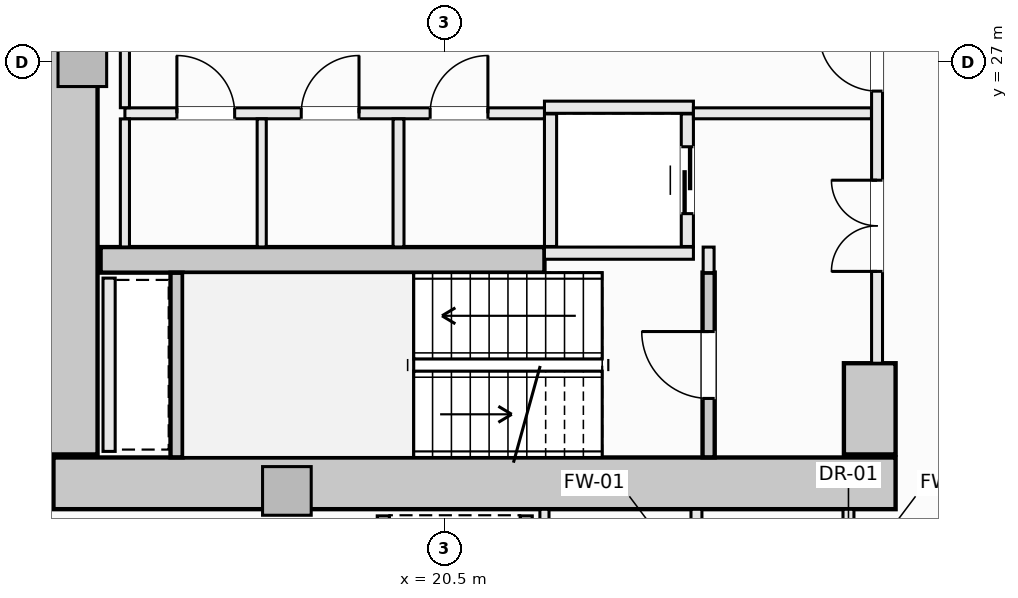
"""IFC4 building model, lengths in metres.
Left out: names, types, materials, properties, quantities, classifications, styles, units other than length and angle.
Written with IfcOpenShell. Run it as: python <this file> out.ifc"""

import sys

from ifc_helpers import new_model, si_unit, direction, frame, frame_2d, origin, origin_2d, place, context, subcontext, project, spatial, rectangle, extrude, element, fill, save


model = new_model("IFC4")
c1 = context("Model", 3, precision=1e-05, world=origin(), true_north=direction((0.0, 1.0)))
c2 = subcontext(c1, "Body", "Model", "MODEL_VIEW")
j1 = project(units=[si_unit("LENGTHUNIT", "METRE"), si_unit("PLANEANGLEUNIT", "RADIAN")], contexts=[c1])
p1 = place(None, origin())
s1 = spatial("IfcSite", under=j1, at=p1, CompositionType="ELEMENT")
p2 = place(p1, origin())
s2 = spatial("IfcBuilding", under=s1, at=p2, CompositionType="ELEMENT")
p3 = place(p2, frame((0.0, 0.0, 38.05)))
s3 = spatial("IfcBuildingStorey", under=s2, at=p3, CompositionType="ELEMENT", Elevation=38.05)
p4 = place(p3, frame((14.075, 20.075, -0.28), z_axis=(0.0, 0.0, 1.0), x_axis=(1.0, 0.0, 0.0)))
e1 = element("IfcWall", 1, at=p4, inside=s3, PredefinedType="SHEAR", context=c2, shape_type="SweptSolid", body=[
    extrude(rectangle(XDim=13.85, YDim=0.85, at=frame_2d((6.925, 0.0))), origin(), (0.0, 0.0, 1.0), 3.85),
])
p5 = place(p3, frame((14.375, 20.55, -0.28), z_axis=(0.0, 0.0, 1.0), x_axis=(0.0, 1.0, 0.0)))
e2 = element("IfcWall", 2, at=p5, inside=s3, PredefinedType="SHEAR", context=c2, shape_type="SweptSolid", body=[
    extrude(rectangle(XDim=12.9, YDim=0.85, at=frame_2d((6.45, 0.0))), origin(), (0.0, 0.0, 1.0), 3.85),
])
p6 = place(p3, frame((27.5, 20.55, -0.28), z_axis=(0.0, 0.0, 1.0), x_axis=(0.0, 1.0, 0.0)))
e3 = element("IfcWall", 3, at=p6, inside=s3, PredefinedType="SHEAR", context=c2, shape_type="SweptSolid", body=[
    extrude(rectangle(XDim=1.5, YDim=0.85, at=frame_2d((0.75, 0.0))), origin(), (0.0, 0.0, 1.0), 3.85),
])
p7 = place(p3, frame((14.85, 23.75, -0.28), z_axis=(0.0, 0.0, 1.0), x_axis=(1.0, 0.0, 0.0)))
e4 = element("IfcWall", 4, at=p7, inside=s3, PredefinedType="SHEAR", context=c2, shape_type="SweptSolid", body=[
    extrude(rectangle(XDim=7.3, YDim=0.42, at=frame_2d((3.65, 0.0))), origin(), (0.0, 0.0, 1.0), 3.85),
])
for number, where, z_axis, x_axis in (
    (5, (14.55, 27.0, -0.28), (0.0, 0.0, 1.0), (1.0, 0.0, 0.0)),
    (6, (17.914, 19.95, -0.28), (0.0, 0.0, 1.0), (1.0, 0.0, 0.0)),
):
    element("IfcColumn", number, at=place(p3, frame(where, z_axis=z_axis, x_axis=x_axis)), inside=s3, PredefinedType="PILASTER", context=c2, shape_type="SweptSolid", body=[
        extrude(rectangle(XDim=0.8, YDim=0.8, at=origin_2d()), origin(), (0.0, 0.0, 1.0), 3.85),
    ])
p8 = place(p3, frame((24.85, 20.502, -0.28), z_axis=(0.0, 0.0, 1.0), x_axis=(0.0, 1.0, 0.0)))
e7 = element("IfcWall", 7, at=p8, inside=s3, PredefinedType="SHEAR", context=c2, shape_type="SweptSolid", body=[
    extrude(rectangle(XDim=3.038, YDim=0.2, at=frame_2d((1.519, 0.0))), origin(), (0.0, 0.0, 1.0), 3.85),
])
p9 = place(p8, frame((0.969, 0.0, 0.28)))
e8 = element("IfcOpeningElement", 8, at=p9, cuts=e7, PredefinedType="OPENING", context=c2, shape_type="SweptSolid", body=[
    extrude(rectangle(XDim=1.1, YDim=2.15, at=frame_2d((0.55, 1.075))), frame((0.0, 0.11, 0.0), z_axis=(0.0, -1.0, 0.0), x_axis=(1.0, 0.0, 0.0)), (0.0, 0.0, 1.0), 0.22),
])
p10 = place(p3, frame((16.1, 20.502, -0.28), z_axis=(0.0, 0.0, 1.0), x_axis=(0.0, 1.0, 0.0)))
e9 = element("IfcWall", 9, at=p10, inside=s3, PredefinedType="SHEAR", context=c2, shape_type="SweptSolid", body=[
    extrude(rectangle(XDim=3.036, YDim=0.2, at=frame_2d((1.518, 0.0))), origin(), (0.0, 0.0, 1.0), 3.85),
])
for number, where, z_axis, x_axis in (
    (10, (22.15, 26.26, 0.0), (0.0, 0.0, 1.0), (1.0, 0.0, 0.0)),
    (11, (22.15, 23.86, 0.0), (0.0, 0.0, 1.0), (1.0, 0.0, 0.0)),
):
    element("IfcWall", number, at=place(p3, frame(where, z_axis=z_axis, x_axis=x_axis)), inside=s3, PredefinedType="SOLIDWALL", context=c2, shape_type="SweptSolid", body=[
        extrude(rectangle(XDim=2.45, YDim=0.2, at=frame_2d((1.225, 0.0))), origin(), (0.0, 0.0, 1.0), 3.57),
    ])
p11 = place(p3, frame((22.25, 23.97, 0.0), z_axis=(0.0, 0.0, 1.0), x_axis=(0.0, 1.0, 0.0)))
e12 = element("IfcWall", 12, at=p11, inside=s3, PredefinedType="SOLIDWALL", context=c2, shape_type="SweptSolid", body=[
    extrude(rectangle(XDim=2.18, YDim=0.2, at=frame_2d((1.09, 0.0))), origin(), (0.0, 0.0, 1.0), 3.57),
])
p12 = place(p3, frame((24.5, 23.97, 0.0), z_axis=(0.0, 0.0, 1.0), x_axis=(0.0, 1.0, 0.0)))
e13 = element("IfcWall", 13, at=p12, inside=s3, PredefinedType="SOLIDWALL", context=c2, shape_type="SweptSolid", body=[
    extrude(rectangle(XDim=2.18, YDim=0.2, at=frame_2d((1.09, 0.0))), origin(), (0.0, 0.0, 1.0), 3.57),
])
p13 = place(p12, frame((0.54, 0.0, 0.0)))
e14 = element("IfcOpeningElement", 14, at=p13, cuts=e13, PredefinedType="OPENING", context=c2, shape_type="SweptSolid", body=[
    extrude(rectangle(XDim=1.1, YDim=2.2, at=frame_2d((0.55, 1.1))), frame((0.0, 0.11, 0.0), z_axis=(0.0, -1.0, 0.0), x_axis=(1.0, 0.0, 0.0)), (0.0, 0.0, 1.0), 0.22),
])
for number, where, z_axis, x_axis in (
    (15, (19.5, 17.01, 0.0), (0.0, 0.0, 1.0), (0.0, 1.0, 0.0)),
    (16, (21.85, 17.01, 0.0), (0.0, 0.0, 1.0), (0.0, 1.0, 0.0)),
):
    element("IfcWall", number, at=place(p3, frame(where, z_axis=z_axis, x_axis=x_axis)), inside=s3, PredefinedType="SOLIDWALL", context=c2, shape_type="SweptSolid", body=[
        extrude(rectangle(XDim=2.53, YDim=0.2, at=frame_2d((1.265, 0.0))), origin(), (0.0, 0.0, 1.0), 3.57),
    ])
p14 = place(p3, frame((14.99, 20.6, 0.0), z_axis=(0.0, 0.0, 1.0), x_axis=(0.0, 1.0, 0.0)))
e17 = element("IfcWall", 17, at=p14, inside=s3, PredefinedType="SOLIDWALL", context=c2, shape_type="SweptSolid", body=[
    extrude(rectangle(XDim=2.85, YDim=0.2, at=frame_2d((1.425, 0.0))), origin(), (0.0, 0.0, 1.0), 3.57),
])
p15 = place(p3, frame((24.85, 23.54, 0.0), z_axis=(0.0, 0.0, 1.0), x_axis=(0.0, 1.0, 0.0)))
e18 = element("IfcWall", 18, at=p15, inside=s3, PredefinedType="SOLIDWALL", context=c2, shape_type="SweptSolid", body=[
    extrude(rectangle(XDim=0.42, YDim=0.18, at=frame_2d((0.21, 0.0))), origin(), (0.0, 0.0, 1.0), 3.57),
])
p16 = place(p3, frame((27.62, 22.05, 0.0), z_axis=(0.0, 0.0, 1.0), x_axis=(0.0, 1.0, 0.0)))
e19 = element("IfcWall", 19, at=p16, inside=s3, PredefinedType="SOLIDWALL", context=c2, shape_type="SweptSolid", body=[
    extrude(rectangle(XDim=9.9, YDim=0.18, at=frame_2d((4.95, 0.0))), origin(), (0.0, 0.0, 1.0), 2.662),
])
p17 = place(p16, frame((4.475, 0.0, 0.0)))
e20 = element("IfcOpeningElement", 20, at=p17, cuts=e19, PredefinedType="OPENING", context=c2, shape_type="SweptSolid", body=[
    extrude(rectangle(XDim=0.95, YDim=2.1, at=frame_2d((0.475, 1.05))), frame((0.0, 0.1, 0.0), z_axis=(0.0, -1.0, 0.0), x_axis=(1.0, 0.0, 0.0)), (0.0, 0.0, 1.0), 0.2),
])
p18 = place(p16, frame((6.89, 0.0, 0.0)))
e21 = element("IfcOpeningElement", 21, at=p18, cuts=e19, PredefinedType="OPENING", context=c2, shape_type="SweptSolid", body=[
    extrude(rectangle(XDim=1.5, YDim=2.2, at=frame_2d((0.75, 1.1))), frame((0.0, 0.1, 0.0), z_axis=(0.0, -1.0, 0.0), x_axis=(1.0, 0.0, 0.0)), (0.0, 0.0, 1.0), 0.2),
])
p19 = place(p16, frame((1.51, 0.0, 0.0)))
e22 = element("IfcOpeningElement", 22, at=p19, cuts=e19, PredefinedType="OPENING", context=c2, shape_type="SweptSolid", body=[
    extrude(rectangle(XDim=1.5, YDim=2.2, at=frame_2d((0.75, 1.1))), frame((0.0, 0.1, 0.0), z_axis=(0.0, -1.0, 0.0), x_axis=(1.0, 0.0, 0.0)), (0.0, 0.0, 1.0), 0.2),
])
p20 = place(p3, frame((15.25, 26.16, 0.0), z_axis=(0.0, 0.0, 1.0), x_axis=(1.0, 0.0, 0.0)))
e23 = element("IfcWall", 23, at=p20, inside=s3, PredefinedType="SOLIDWALL", context=c2, shape_type="SweptSolid", body=[
    extrude(rectangle(XDim=6.9, YDim=0.18, at=frame_2d((3.45, 0.0))), origin(), (0.0, 0.0, 1.0), 3.57),
])
p21 = place(p20, frame((5.02, 0.0, 0.0)))
e24 = element("IfcOpeningElement", 24, at=p21, cuts=e23, PredefinedType="OPENING", context=c2, shape_type="SweptSolid", body=[
    extrude(rectangle(XDim=0.95, YDim=2.1, at=frame_2d((0.475, 1.05))), frame((0.0, 0.1, 0.0), z_axis=(0.0, -1.0, 0.0), x_axis=(1.0, 0.0, 0.0)), (0.0, 0.0, 1.0), 0.2),
])
p22 = place(p20, frame((0.855, 0.0, 0.0)))
e25 = element("IfcOpeningElement", 25, at=p22, cuts=e23, PredefinedType="OPENING", context=c2, shape_type="SweptSolid", body=[
    extrude(rectangle(XDim=0.95, YDim=2.1, at=frame_2d((0.475, 1.05))), frame((0.0, 0.1, 0.0), z_axis=(0.0, -1.0, 0.0), x_axis=(1.0, 0.0, 0.0)), (0.0, 0.0, 1.0), 0.2),
])
p23 = place(p20, frame((2.9, 0.0, 0.0)))
e26 = element("IfcOpeningElement", 26, at=p23, cuts=e23, PredefinedType="OPENING", context=c2, shape_type="SweptSolid", body=[
    extrude(rectangle(XDim=0.95, YDim=2.1, at=frame_2d((0.475, 1.05))), frame((0.0, 0.1, 0.0), z_axis=(0.0, -1.0, 0.0), x_axis=(1.0, 0.0, 0.0)), (0.0, 0.0, 1.0), 0.2),
])
p24 = place(p3, frame((24.6, 26.16, 0.0), z_axis=(0.0, 0.0, 1.0), x_axis=(1.0, 0.0, 0.0)))
e27 = element("IfcWall", 27, at=p24, inside=s3, PredefinedType="SOLIDWALL", context=c2, shape_type="SweptSolid", body=[
    extrude(rectangle(XDim=2.928, YDim=0.18, at=frame_2d((1.464, 0.0))), origin(), (0.0, 0.0, 1.0), 3.57),
])
p25 = place(p3, frame((15.25, 23.962, 0.0), z_axis=(0.0, 0.0, 1.0), x_axis=(0.0, 1.0, 0.0)))
e28 = element("IfcWall", 28, at=p25, inside=s3, PredefinedType="PARTITIONING", context=c2, shape_type="SweptSolid", body=[
    extrude(rectangle(XDim=2.106, YDim=0.15, at=frame_2d((1.053, 0.0))), origin(), (0.0, 0.0, 1.0), 3.57),
])
p26 = place(p3, frame((15.25, 26.252, 0.0), z_axis=(0.0, 0.0, 1.0), x_axis=(0.0, 1.0, 0.0)))
e29 = element("IfcWall", 29, at=p26, inside=s3, PredefinedType="PARTITIONING", context=c2, shape_type="SweptSolid", body=[
    extrude(rectangle(XDim=1.496, YDim=0.15, at=frame_2d((0.748, 0.0))), origin(), (0.0, 0.0, 1.0), 3.57),
])
p27 = place(p3, frame((19.75, 23.962, 0.0), z_axis=(0.0, 0.0, 1.0), x_axis=(0.0, 1.0, 0.0)))
e30 = element("IfcWall", 30, at=p27, inside=s3, PredefinedType="SOLIDWALL", context=c2, shape_type="SweptSolid", body=[
    extrude(rectangle(XDim=2.106, YDim=0.18, at=frame_2d((1.053, 0.0))), origin(), (0.0, 0.0, 1.0), 3.57),
])
p28 = place(p3, frame((17.5, 23.962, 0.0), z_axis=(0.0, 0.0, 1.0), x_axis=(0.0, 1.0, 0.0)))
e31 = element("IfcWall", 31, at=p28, inside=s3, PredefinedType="PARTITIONING", context=c2, shape_type="SweptSolid", body=[
    extrude(rectangle(XDim=2.106, YDim=0.15, at=frame_2d((1.053, 0.0))), origin(), (0.0, 0.0, 1.0), 3.57),
])
p29 = place(p3, frame((22.15, 17.142, 0.0), z_axis=(0.0, 0.0, 1.0), x_axis=(0.0, 1.0, 0.0)))
e32 = element("IfcWall", 32, at=p29, inside=s3, PredefinedType="PARTITIONING", context=c2, shape_type="SweptSolid", body=[
    extrude(rectangle(XDim=2.506, YDim=0.15, at=frame_2d((1.253, 0.0))), origin(), (0.0, 0.0, 1.0), 3.57),
])
p30 = place(p3, frame((24.65, 17.142, 0.0), z_axis=(0.0, 0.0, 1.0), x_axis=(0.0, 1.0, 0.0)))
e33 = element("IfcWall", 33, at=p30, inside=s3, PredefinedType="SOLIDWALL", context=c2, shape_type="SweptSolid", body=[
    extrude(rectangle(XDim=2.506, YDim=0.18, at=frame_2d((1.253, 0.0))), origin(), (0.0, 0.0, 1.0), 3.57),
])
p31 = place(p30, frame((0.778, 0.0, 0.0)))
e34 = element("IfcOpeningElement", 34, at=p31, cuts=e33, PredefinedType="OPENING", context=c2, shape_type="SweptSolid", body=[
    extrude(rectangle(XDim=0.95, YDim=2.1, at=frame_2d((0.475, 1.05))), frame((0.0, 0.1, 0.0), z_axis=(0.0, -1.0, 0.0), x_axis=(1.0, 0.0, 0.0)), (0.0, 0.0, 1.0), 0.2),
])
p32 = place(p3, frame((27.15, 17.142, 0.0), z_axis=(0.0, 0.0, 1.0), x_axis=(0.0, 1.0, 0.0)))
e35 = element("IfcWall", 35, at=p32, inside=s3, PredefinedType="SOLIDWALL", context=c2, shape_type="SweptSolid", body=[
    extrude(rectangle(XDim=2.506, YDim=0.18, at=frame_2d((1.253, 0.0))), origin(), (0.0, 0.0, 1.0), 3.57),
])
p33 = place(p32, frame((0.778, 0.0, 0.0)))
e36 = element("IfcOpeningElement", 36, at=p33, cuts=e35, PredefinedType="OPENING", context=c2, shape_type="SweptSolid", body=[
    extrude(rectangle(XDim=0.95, YDim=2.1, at=frame_2d((0.475, 1.05))), frame((0.0, 0.1, 0.0), z_axis=(0.0, -1.0, 0.0), x_axis=(1.0, 0.0, 0.0)), (0.0, 0.0, 1.0), 0.2),
])
p34 = place(p3, frame((3.094, 21.29, 0.0), z_axis=(0.0, 0.0, 1.0), x_axis=(0.936344026666, -0.35108384145, 0.0)))
e37 = element("IfcWall", 37, at=p34, inside=s3, PredefinedType="PARTITIONING", context=c2, shape_type="SweptSolid", body=[
    extrude(rectangle(XDim=21.62, YDim=0.12, at=frame_2d((10.81, 0.0))), origin(), (0.0, 0.0, 1.0), 3.57),
])
p35 = place(p9, origin())
e38 = element("IfcDoor", 38, at=p35, inside=s3, OperationType="SINGLE_SWING_RIGHT", PredefinedType="DOOR", context=c2, shape_type="SweptSolid", body=[
    extrude(rectangle(XDim=1.1, YDim=2.15, at=frame_2d((0.55, 1.075))), frame((0.0, 0.025, 0.0), z_axis=(0.0, -1.0, 0.0), x_axis=(1.0, 0.0, 0.0)), (0.0, 0.0, 1.0), 0.05),
])
fill(e8, e38)
p36 = place(p13, origin())
e39 = element("IfcDoor", 39, at=p36, inside=s3, OperationType="SLIDING_TO_LEFT", PredefinedType="DOOR", context=c2, shape_type="SweptSolid", body=[
    extrude(rectangle(XDim=1.1, YDim=2.2, at=frame_2d((0.55, 1.1))), frame((0.0, 0.025, 0.0), z_axis=(0.0, -1.0, 0.0), x_axis=(1.0, 0.0, 0.0)), (0.0, 0.0, 1.0), 0.05),
])
fill(e14, e39)
p37 = place(p17, origin())
e40 = element("IfcDoor", 40, at=p37, inside=s3, OperationType="SINGLE_SWING_RIGHT", PredefinedType="DOOR", context=c2, shape_type="SweptSolid", body=[
    extrude(rectangle(XDim=0.95, YDim=2.1, at=frame_2d((0.475, 1.05))), frame((0.0, 0.025, 0.0), z_axis=(0.0, -1.0, 0.0), x_axis=(1.0, 0.0, 0.0)), (0.0, 0.0, 1.0), 0.05),
])
fill(e20, e40)
p38 = place(p19, origin())
e41 = element("IfcDoor", 41, at=p38, inside=s3, OperationType="DOUBLE_DOOR_SINGLE_SWING", PredefinedType="DOOR", context=c2, shape_type="SweptSolid", body=[
    extrude(rectangle(XDim=1.5, YDim=2.2, at=frame_2d((0.75, 1.1))), frame((0.0, 0.025, 0.0), z_axis=(0.0, -1.0, 0.0), x_axis=(1.0, 0.0, 0.0)), (0.0, 0.0, 1.0), 0.05),
])
fill(e22, e41)
p39 = place(p21, origin())
e42 = element("IfcDoor", 42, at=p39, inside=s3, OperationType="SINGLE_SWING_RIGHT", PredefinedType="DOOR", context=c2, shape_type="SweptSolid", body=[
    extrude(rectangle(XDim=0.95, YDim=2.1, at=frame_2d((0.475, 1.05))), frame((0.0, 0.025, 0.0), z_axis=(0.0, -1.0, 0.0), x_axis=(1.0, 0.0, 0.0)), (0.0, 0.0, 1.0), 0.05),
])
fill(e24, e42)
p40 = place(p22, origin())
e43 = element("IfcDoor", 43, at=p40, inside=s3, OperationType="SINGLE_SWING_LEFT", PredefinedType="DOOR", context=c2, shape_type="SweptSolid", body=[
    extrude(rectangle(XDim=0.95, YDim=2.1, at=frame_2d((0.475, 1.05))), frame((0.0, 0.025, 0.0), z_axis=(0.0, -1.0, 0.0), x_axis=(1.0, 0.0, 0.0)), (0.0, 0.0, 1.0), 0.05),
])
fill(e25, e43)
p41 = place(p23, origin())
e44 = element("IfcDoor", 44, at=p41, inside=s3, OperationType="SINGLE_SWING_RIGHT", PredefinedType="DOOR", context=c2, shape_type="SweptSolid", body=[
    extrude(rectangle(XDim=0.95, YDim=2.1, at=frame_2d((0.475, 1.05))), frame((0.0, 0.025, 0.0), z_axis=(0.0, -1.0, 0.0), x_axis=(1.0, 0.0, 0.0)), (0.0, 0.0, 1.0), 0.05),
])
fill(e26, e44)
save(model, sys.argv[1])
